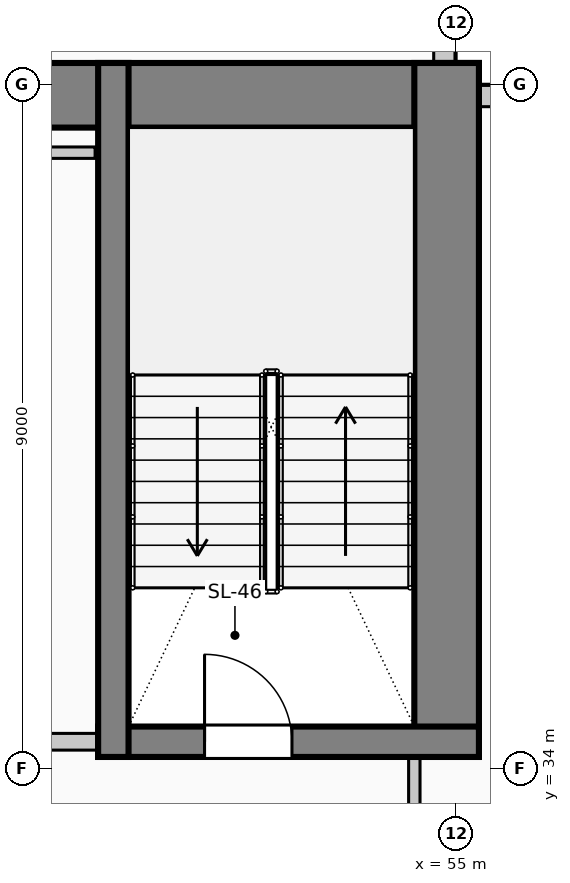
"""IFC4 building model, lengths in metres.
Left out: names, types, materials, properties, quantities, classifications, styles, units other than length and angle.
Written with IfcOpenShell. Run it as: python <this file> out.ifc"""

import sys

from ifc_helpers import new_model, si_unit, direction, frame, frame_2d, origin, place, context, subcontext, project, spatial, rectangle, extrude, element, fill, save


model = new_model("IFC4")
c1 = context("Model", 3, precision=1e-05, world=origin(), true_north=direction((0.0, 1.0)))
c2 = subcontext(c1, "Body", "Model", "MODEL_VIEW")
j1 = project(units=[si_unit("LENGTHUNIT", "METRE"), si_unit("PLANEANGLEUNIT", "RADIAN")], contexts=[c1])
p1 = place(None, origin())
s1 = spatial("IfcSite", under=j1, at=p1, CompositionType="ELEMENT")
p2 = place(p1, origin())
s2 = spatial("IfcBuilding", under=s1, at=p2, CompositionType="ELEMENT")
p3 = place(p2, frame((0.0, 0.0, 100.6)))
s3 = spatial("IfcBuildingStorey", under=s2, at=p3, CompositionType="ELEMENT", Elevation=100.6)
p4 = place(p3, frame((40.7, 42.855, 0.0), z_axis=(0.0, 0.0, 1.0), x_axis=(1.0, 0.0, 0.0)))
e1 = element("IfcWall", 1, at=p4, inside=s3, PredefinedType="SHEAR", context=c2, shape_type="SweptSolid", body=[
    extrude(rectangle(XDim=14.6, YDim=0.85, at=frame_2d((7.3, 0.0))), origin(), (0.0, 0.0, 1.0), 4.0),
])
p5 = place(p3, frame((54.875, 34.15, 0.0), z_axis=(0.0, 0.0, 1.0), x_axis=(0.0, 1.0, 0.0)))
e2 = element("IfcWall", 2, at=p5, inside=s3, PredefinedType="SHEAR", context=c2, shape_type="SweptSolid", body=[
    extrude(rectangle(XDim=9.13, YDim=0.85, at=frame_2d((4.565, 0.0))), origin(), (0.0, 0.0, 1.0), 4.0),
])
p6 = place(p3, frame((50.29, 34.35, 0.0), z_axis=(0.0, 0.0, 1.0), x_axis=(1.0, 0.0, 0.0)))
e3 = element("IfcWall", 3, at=p6, inside=s3, PredefinedType="SHEAR", context=c2, shape_type="SweptSolid", body=[
    extrude(rectangle(XDim=5.01, YDim=0.4, at=frame_2d((2.505, 0.0))), origin(), (0.0, 0.0, 1.0), 4.0),
])
p7 = place(p6, frame((1.4, 0.0, 0.0)))
e4 = element("IfcOpeningElement", 4, at=p7, cuts=e3, PredefinedType="OPENING", context=c2, shape_type="SweptSolid", body=[
    extrude(rectangle(XDim=1.15, YDim=2.2, at=frame_2d((0.575, 1.1))), frame((0.0, 0.21, 0.0), z_axis=(0.0, -1.0, 0.0), x_axis=(1.0, 0.0, 0.0)), (0.0, 0.0, 1.0), 0.42),
])
p8 = place(p3, frame((50.49, 34.15, 0.0), z_axis=(0.0, 0.0, 1.0), x_axis=(0.0, 1.0, 0.0)))
e5 = element("IfcWall", 5, at=p8, inside=s3, PredefinedType="SHEAR", context=c2, shape_type="SweptSolid", body=[
    extrude(rectangle(XDim=9.13, YDim=0.4, at=frame_2d((4.565, 0.0))), origin(), (0.0, 0.0, 1.0), 4.0),
])
p9 = place(p3, frame((54.845, 45.4, 0.0), z_axis=(0.0, 0.0, 1.0), x_axis=(0.0, -1.0, 0.0)))
e6 = element("IfcWall", 6, at=p9, inside=s3, PredefinedType="SOLIDWALL", context=c2, shape_type="SweptSolid", body=[
    extrude(rectangle(XDim=2.115, YDim=0.28, at=frame_2d((1.058, 0.0))), origin(), (0.0, 0.0, 1.0), 3.725),
])
p10 = place(p3, frame((55.305, 42.845, 0.0), z_axis=(0.0, 0.0, 1.0), x_axis=(1.0, 0.0, 0.0)))
e7 = element("IfcWall", 7, at=p10, inside=s3, PredefinedType="SOLIDWALL", context=c2, shape_type="SweptSolid", body=[
    extrude(rectangle(XDim=2.095, YDim=0.28, at=frame_2d((1.047, 0.0))), origin(), (0.0, 0.0, 1.0), 3.725),
])
p11 = place(p3, frame((45.72, 34.35, 0.0), z_axis=(0.0, 0.0, 1.0), x_axis=(1.0, 0.0, 0.0)))
e8 = element("IfcWall", 8, at=p11, inside=s3, PredefinedType="PARTITIONING", context=c2, shape_type="SweptSolid", body=[
    extrude(rectangle(XDim=4.56, YDim=0.22, at=frame_2d((2.28, 0.0))), origin(), (0.0, 0.0, 1.0), 3.725),
])
p12 = place(p11, frame((0.65, 0.0, 0.0)))
e9 = element("IfcOpeningElement", 9, at=p12, cuts=e8, PredefinedType="OPENING", context=c2, shape_type="SweptSolid", body=[
    extrude(rectangle(XDim=0.92, YDim=2.1, at=frame_2d((0.46, 1.05))), frame((0.0, 0.12, 0.0), z_axis=(0.0, -1.0, 0.0), x_axis=(1.0, 0.0, 0.0)), (0.0, 0.0, 1.0), 0.24),
])
p13 = place(p11, frame((2.95, 0.0, 0.0)))
e10 = element("IfcOpeningElement", 10, at=p13, cuts=e8, PredefinedType="OPENING", context=c2, shape_type="SweptSolid", body=[
    extrude(rectangle(XDim=0.88, YDim=2.1, at=frame_2d((0.44, 1.05))), frame((0.0, 0.12, 0.0), z_axis=(0.0, -1.0, 0.0), x_axis=(1.0, 0.0, 0.0)), (0.0, 0.0, 1.0), 0.24),
])
p14 = place(p3, frame((48.0, 42.1, 0.0), z_axis=(0.0, 0.0, 1.0), x_axis=(1.0, 0.0, 0.0)))
e11 = element("IfcWall", 11, at=p14, inside=s3, PredefinedType="PARTITIONING", context=c2, shape_type="SweptSolid", body=[
    extrude(rectangle(XDim=2.25, YDim=0.15, at=frame_2d((1.125, 0.0))), origin(), (0.0, 0.0, 1.0), 3.725),
])
p15 = place(p3, frame((54.45, 32.425, 0.0), z_axis=(0.0, 0.0, 1.0), x_axis=(0.0, 1.0, 0.0)))
e12 = element("IfcWall", 12, at=p15, inside=s3, PredefinedType="PARTITIONING", context=c2, shape_type="SweptSolid", body=[
    extrude(rectangle(XDim=1.725, YDim=0.15, at=frame_2d((0.862, 0.0))), origin(), (0.0, 0.0, 1.0), 3.725),
])
p16 = place(p7, origin())
e13 = element("IfcDoor", 13, at=p16, inside=s3, OperationType="SINGLE_SWING_LEFT", PredefinedType="DOOR", context=c2, shape_type="SweptSolid", body=[
    extrude(rectangle(XDim=1.15, YDim=2.2, at=frame_2d((0.575, 1.1))), frame((0.0, 0.025, 0.0), z_axis=(0.0, -1.0, 0.0), x_axis=(1.0, 0.0, 0.0)), (0.0, 0.0, 1.0), 0.05),
])
fill(e4, e13)
save(model, sys.argv[1])
